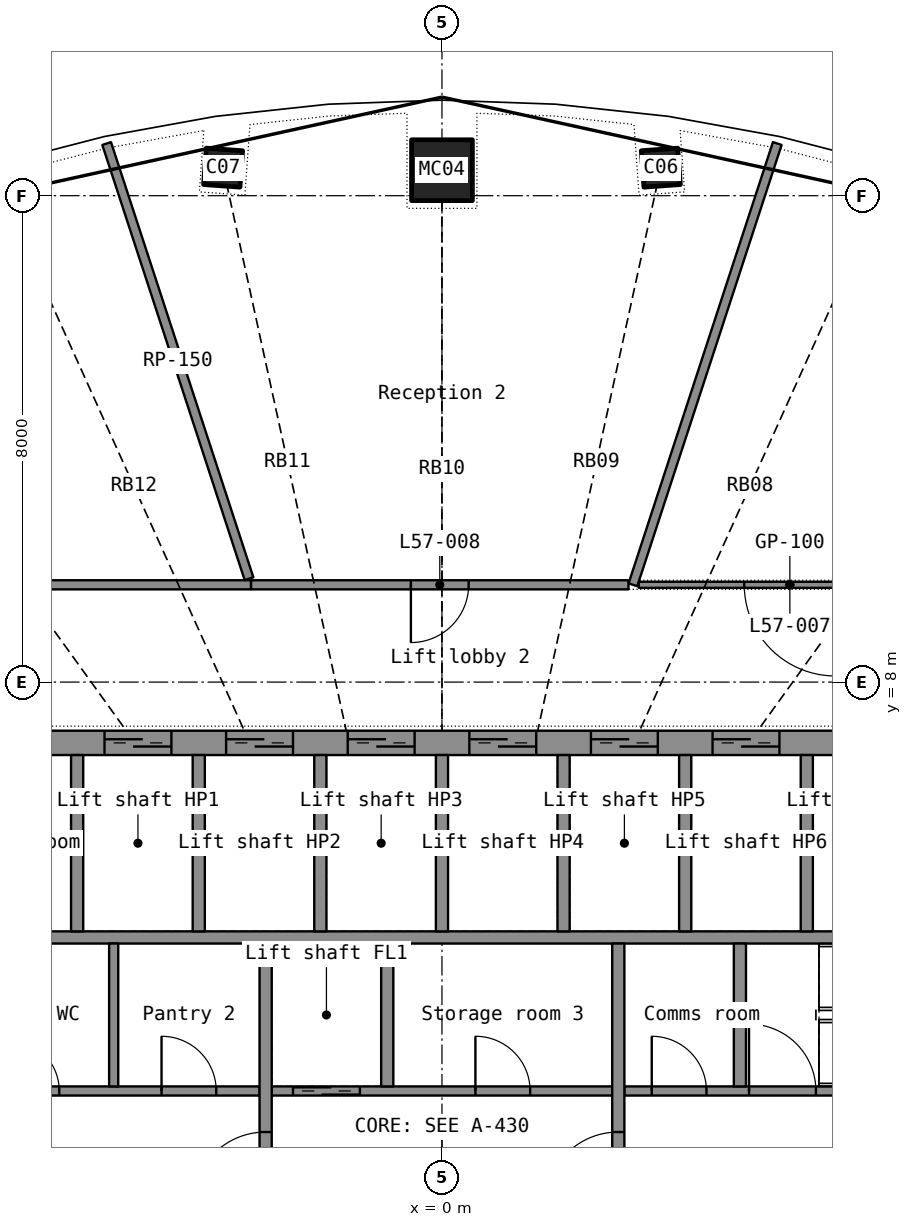
"""IFC4 building model, lengths in metres.
Left out: names, types, materials, properties, quantities, classifications, styles, units other than length and angle.
Written with IfcOpenShell. Run it as: python <this file> out.ifc"""

import sys

from ifc_helpers import new_model, si_unit, direction, frame, frame_2d, origin, origin_2d, place, context, subcontext, project, spatial, rectangle, hollow_rectangle, extrude, element, fill, save


model = new_model("IFC4")
c1 = context("Model", 3, precision=1e-05, world=origin(), true_north=direction((0.0, 1.0)))
c2 = subcontext(c1, "Body", "Model", "MODEL_VIEW")
j1 = project(units=[si_unit("LENGTHUNIT", "METRE"), si_unit("PLANEANGLEUNIT", "RADIAN")], contexts=[c1])
p1 = place(None, origin())
s1 = spatial("IfcSite", under=j1, at=p1, CompositionType="ELEMENT")
p2 = place(p1, origin())
s2 = spatial("IfcBuilding", under=s1, at=p2, CompositionType="ELEMENT")
p3 = place(p2, frame((0.0, 0.0, 235.6)))
s3 = spatial("IfcBuildingStorey", under=s2, at=p3, CompositionType="ELEMENT", Elevation=235.6)
p4 = place(p3, frame((3.6, 16.461, 0.0), z_axis=(-0.006002173, -0.027900212, 0.999592693), x_axis=(0.990201099, -0.139633766, 0.002048381)))
e1 = element("IfcColumn", 1, at=p4, inside=s3, PredefinedType="COLUMN", context=c2, shape_type="SweptSolid", body=[
    extrude(hollow_rectangle(XDim=0.6, YDim=0.6, WallThickness=0.025, at=origin_2d()), origin(), (0.0, 0.0, 1.0), 3.701),
])
p5 = place(p3, frame((0.0, 16.419, 0.0), z_axis=(0.0, -0.02836206, 0.999597716), x_axis=(1.0, 0.0, 0.0)))
e2 = element("IfcColumn", 2, at=p5, inside=s3, PredefinedType="COLUMN", context=c2, shape_type="SweptSolid", body=[
    extrude(hollow_rectangle(XDim=1.0, YDim=1.0, WallThickness=0.032, at=origin_2d()), origin(), (0.0, 0.0, 1.0), 3.701),
])
p6 = place(p3, frame((-3.6, 16.461, 0.0), z_axis=(0.006002173, -0.027900212, 0.999592693), x_axis=(0.990201099, 0.139633766, -0.002048381)))
e3 = element("IfcColumn", 3, at=p6, inside=s3, PredefinedType="COLUMN", context=c2, shape_type="SweptSolid", body=[
    extrude(hollow_rectangle(XDim=0.6, YDim=0.6, WallThickness=0.025, at=origin_2d()), origin(), (0.0, 0.0, 1.0), 3.701),
])
p7 = place(p3, frame((-11.6, 7.0, 0.0), z_axis=(0.0, 0.0, 1.0), x_axis=(1.0, 0.0, 0.0)))
e4 = element("IfcWall", 4, at=p7, inside=s3, PredefinedType="SHEAR", context=c2, shape_type="SweptSolid", body=[
    extrude(rectangle(XDim=23.2, YDim=0.4, at=frame_2d((11.6, 0.0))), origin(), (0.0, 0.0, 1.0), 3.3),
])
p8 = place(p7, frame((2.05, 0.0, 0.0)))
e5 = element("IfcOpeningElement", 5, at=p8, cuts=e4, PredefinedType="OPENING", context=c2, shape_type="SweptSolid", body=[
    extrude(rectangle(XDim=1.1, YDim=2.2, at=frame_2d((0.55, 1.1))), frame((0.0, 0.21, 0.0), z_axis=(0.0, -1.0, 0.0), x_axis=(1.0, 0.0, 0.0)), (0.0, 0.0, 1.0), 0.42),
])
p9 = place(p7, frame((6.05, 0.0, 0.0)))
e6 = element("IfcOpeningElement", 6, at=p9, cuts=e4, PredefinedType="OPENING", context=c2, shape_type="SweptSolid", body=[
    extrude(rectangle(XDim=1.1, YDim=2.2, at=frame_2d((0.55, 1.1))), frame((0.0, 0.21, 0.0), z_axis=(0.0, -1.0, 0.0), x_axis=(1.0, 0.0, 0.0)), (0.0, 0.0, 1.0), 0.42),
])
p10 = place(p7, frame((8.05, 0.0, 0.0)))
e7 = element("IfcOpeningElement", 7, at=p10, cuts=e4, PredefinedType="OPENING", context=c2, shape_type="SweptSolid", body=[
    extrude(rectangle(XDim=1.1, YDim=2.2, at=frame_2d((0.55, 1.1))), frame((0.0, 0.21, 0.0), z_axis=(0.0, -1.0, 0.0), x_axis=(1.0, 0.0, 0.0)), (0.0, 0.0, 1.0), 0.42),
])
p11 = place(p7, frame((10.05, 0.0, 0.0)))
e8 = element("IfcOpeningElement", 8, at=p11, cuts=e4, PredefinedType="OPENING", context=c2, shape_type="SweptSolid", body=[
    extrude(rectangle(XDim=1.1, YDim=2.2, at=frame_2d((0.55, 1.1))), frame((0.0, 0.21, 0.0), z_axis=(0.0, -1.0, 0.0), x_axis=(1.0, 0.0, 0.0)), (0.0, 0.0, 1.0), 0.42),
])
p12 = place(p7, frame((12.05, 0.0, 0.0)))
e9 = element("IfcOpeningElement", 9, at=p12, cuts=e4, PredefinedType="OPENING", context=c2, shape_type="SweptSolid", body=[
    extrude(rectangle(XDim=1.1, YDim=2.2, at=frame_2d((0.55, 1.1))), frame((0.0, 0.21, 0.0), z_axis=(0.0, -1.0, 0.0), x_axis=(1.0, 0.0, 0.0)), (0.0, 0.0, 1.0), 0.42),
])
p13 = place(p7, frame((14.05, 0.0, 0.0)))
e10 = element("IfcOpeningElement", 10, at=p13, cuts=e4, PredefinedType="OPENING", context=c2, shape_type="SweptSolid", body=[
    extrude(rectangle(XDim=1.1, YDim=2.2, at=frame_2d((0.55, 1.1))), frame((0.0, 0.21, 0.0), z_axis=(0.0, -1.0, 0.0), x_axis=(1.0, 0.0, 0.0)), (0.0, 0.0, 1.0), 0.42),
])
p14 = place(p7, frame((16.05, 0.0, 0.0)))
e11 = element("IfcOpeningElement", 11, at=p14, cuts=e4, PredefinedType="OPENING", context=c2, shape_type="SweptSolid", body=[
    extrude(rectangle(XDim=1.1, YDim=2.2, at=frame_2d((0.55, 1.1))), frame((0.0, 0.21, 0.0), z_axis=(0.0, -1.0, 0.0), x_axis=(1.0, 0.0, 0.0)), (0.0, 0.0, 1.0), 0.42),
])
p15 = place(p7, frame((18.05, 0.0, 0.0)))
e12 = element("IfcOpeningElement", 12, at=p15, cuts=e4, PredefinedType="OPENING", context=c2, shape_type="SweptSolid", body=[
    extrude(rectangle(XDim=1.1, YDim=2.2, at=frame_2d((0.55, 1.1))), frame((0.0, 0.21, 0.0), z_axis=(0.0, -1.0, 0.0), x_axis=(1.0, 0.0, 0.0)), (0.0, 0.0, 1.0), 0.42),
])
p16 = place(p7, frame((20.05, 0.0, 0.0)))
e13 = element("IfcOpeningElement", 13, at=p16, cuts=e4, PredefinedType="OPENING", context=c2, shape_type="SweptSolid", body=[
    extrude(rectangle(XDim=1.1, YDim=2.2, at=frame_2d((0.55, 1.1))), frame((0.0, 0.21, 0.0), z_axis=(0.0, -1.0, 0.0), x_axis=(1.0, 0.0, 0.0)), (0.0, 0.0, 1.0), 0.42),
])
p17 = place(p7, frame((4.15, 0.0, 0.0)))
e14 = element("IfcOpeningElement", 14, at=p17, cuts=e4, PredefinedType="OPENING", context=c2, shape_type="SweptSolid", body=[
    extrude(rectangle(XDim=0.9, YDim=2.1, at=frame_2d((0.45, 1.05))), frame((0.0, 0.21, 0.0), z_axis=(0.0, -1.0, 0.0), x_axis=(1.0, 0.0, 0.0)), (0.0, 0.0, 1.0), 0.42),
])
p18 = place(p7, frame((0.35, 0.0, 0.0)))
e15 = element("IfcOpeningElement", 15, at=p18, cuts=e4, PredefinedType="OPENING", context=c2, shape_type="SweptSolid", body=[
    extrude(rectangle(XDim=0.8, YDim=2.05, at=frame_2d((0.4, 1.025))), frame((0.0, 0.21, 0.0), z_axis=(0.0, -1.0, 0.0), x_axis=(1.0, 0.0, 0.0)), (0.0, 0.0, 1.0), 0.42),
])
p19 = place(p7, frame((22.05, 0.0, 0.0)))
e16 = element("IfcOpeningElement", 16, at=p19, cuts=e4, PredefinedType="OPENING", context=c2, shape_type="SweptSolid", body=[
    extrude(rectangle(XDim=0.8, YDim=2.05, at=frame_2d((0.4, 1.025))), frame((0.0, 0.21, 0.0), z_axis=(0.0, -1.0, 0.0), x_axis=(1.0, 0.0, 0.0)), (0.0, 0.0, 1.0), 0.42),
])
p20 = place(p3, frame((-11.6, 3.8, 0.0), z_axis=(0.0, 0.0, 1.0), x_axis=(1.0, 0.0, 0.0)))
e17 = element("IfcWall", 17, at=p20, inside=s3, PredefinedType="SHEAR", context=c2, shape_type="SweptSolid", body=[
    extrude(rectangle(XDim=23.2, YDim=0.2, at=frame_2d((11.6, 0.0))), origin(), (0.0, 0.0, 1.0), 3.3),
])
for number, where, z_axis, x_axis in (
    (18, (-6.0, 3.9, 0.0), (0.0, 0.0, 1.0), (0.0, 1.0, 0.0)),
    (19, (-4.0, 3.9, 0.0), (0.0, 0.0, 1.0), (0.0, 1.0, 0.0)),
    (20, (-2.0, 3.9, 0.0), (0.0, 0.0, 1.0), (0.0, 1.0, 0.0)),
    (21, (0.0, 3.9, 0.0), (0.0, 0.0, 1.0), (0.0, 1.0, 0.0)),
    (22, (2.0, 3.9, 0.0), (0.0, 0.0, 1.0), (0.0, 1.0, 0.0)),
    (23, (4.0, 3.9, 0.0), (0.0, 0.0, 1.0), (0.0, 1.0, 0.0)),
    (24, (6.0, 3.9, 0.0), (0.0, 0.0, 1.0), (0.0, 1.0, 0.0)),
):
    element("IfcWall", number, at=place(p3, frame(where, z_axis=z_axis, x_axis=x_axis)), inside=s3, PredefinedType="SHEAR", context=c2, shape_type="SweptSolid", body=[
        extrude(rectangle(XDim=2.9, YDim=0.2, at=frame_2d((1.45, 0.0))), origin(), (0.0, 0.0, 1.0), 3.3),
    ])
p21 = place(p3, frame((-11.6, 1.275, 0.0), z_axis=(0.0, 0.0, 1.0), x_axis=(1.0, 0.0, 0.0)))
e25 = element("IfcWall", 25, at=p21, inside=s3, PredefinedType="PARTITIONING", context=c2, shape_type="SweptSolid", body=[
    extrude(rectangle(XDim=8.6, YDim=0.15, at=frame_2d((4.3, 0.0))), origin(), (0.0, 0.0, 1.0), 3.3),
])
p22 = place(p21, frame((1.318, 0.0, 0.0)))
e26 = element("IfcOpeningElement", 26, at=p22, cuts=e25, PredefinedType="OPENING", context=c2, shape_type="SweptSolid", body=[
    extrude(rectangle(XDim=0.85, YDim=2.1, at=frame_2d((0.425, 1.05))), frame((0.0, 0.085, 0.0), z_axis=(0.0, -1.0, 0.0), x_axis=(1.0, 0.0, 0.0)), (0.0, 0.0, 1.0), 0.17),
])
p23 = place(p21, frame((4.456, 0.0, 0.0)))
e27 = element("IfcOpeningElement", 27, at=p23, cuts=e25, PredefinedType="OPENING", context=c2, shape_type="SweptSolid", body=[
    extrude(rectangle(XDim=0.85, YDim=2.1, at=frame_2d((0.425, 1.05))), frame((0.0, 0.085, 0.0), z_axis=(0.0, -1.0, 0.0), x_axis=(1.0, 0.0, 0.0)), (0.0, 0.0, 1.0), 0.17),
])
p24 = place(p21, frame((6.988, 0.0, 0.0)))
e28 = element("IfcOpeningElement", 28, at=p24, cuts=e25, PredefinedType="OPENING", context=c2, shape_type="SweptSolid", body=[
    extrude(rectangle(XDim=0.9, YDim=2.1, at=frame_2d((0.45, 1.05))), frame((0.0, 0.085, 0.0), z_axis=(0.0, -1.0, 0.0), x_axis=(1.0, 0.0, 0.0)), (0.0, 0.0, 1.0), 0.17),
])
p25 = place(p3, frame((-2.8, 1.275, 0.0), z_axis=(0.0, 0.0, 1.0), x_axis=(1.0, 0.0, 0.0)))
e29 = element("IfcWall", 29, at=p25, inside=s3, PredefinedType="SHEAR", context=c2, shape_type="SweptSolid", body=[
    extrude(rectangle(XDim=5.6, YDim=0.15, at=frame_2d((2.8, 0.0))), origin(), (0.0, 0.0, 1.0), 3.3),
])
p26 = place(p25, frame((0.35, 0.0, 0.0)))
e30 = element("IfcOpeningElement", 30, at=p26, cuts=e29, PredefinedType="OPENING", context=c2, shape_type="SweptSolid", body=[
    extrude(rectangle(XDim=1.1, YDim=2.2, at=frame_2d((0.55, 1.1))), frame((0.0, 0.085, 0.0), z_axis=(0.0, -1.0, 0.0), x_axis=(1.0, 0.0, 0.0)), (0.0, 0.0, 1.0), 0.17),
])
p27 = place(p25, frame((3.35, 0.0, 0.0)))
e31 = element("IfcOpeningElement", 31, at=p27, cuts=e29, PredefinedType="OPENING", context=c2, shape_type="SweptSolid", body=[
    extrude(rectangle(XDim=0.9, YDim=2.1, at=frame_2d((0.45, 1.05))), frame((0.0, 0.085, 0.0), z_axis=(0.0, -1.0, 0.0), x_axis=(1.0, 0.0, 0.0)), (0.0, 0.0, 1.0), 0.17),
])
p28 = place(p3, frame((3.0, 1.275, 0.0), z_axis=(0.0, 0.0, 1.0), x_axis=(1.0, 0.0, 0.0)))
e32 = element("IfcWall", 32, at=p28, inside=s3, PredefinedType="SHEAR", context=c2, shape_type="SweptSolid", body=[
    extrude(rectangle(XDim=8.6, YDim=0.15, at=frame_2d((4.3, 0.0))), origin(), (0.0, 0.0, 1.0), 3.3),
])
p29 = place(p28, frame((2.05, 0.0, 0.0)))
e33 = element("IfcOpeningElement", 33, at=p29, cuts=e32, PredefinedType="OPENING", context=c2, shape_type="SweptSolid", body=[
    extrude(rectangle(XDim=1.1, YDim=2.15, at=frame_2d((0.55, 1.075))), frame((0.0, 0.085, 0.0), z_axis=(0.0, -1.0, 0.0), x_axis=(1.0, 0.0, 0.0)), (0.0, 0.0, 1.0), 0.17),
])
p30 = place(p28, frame((0.45, 0.0, 0.0)))
e34 = element("IfcOpeningElement", 34, at=p30, cuts=e32, PredefinedType="OPENING", context=c2, shape_type="SweptSolid", body=[
    extrude(rectangle(XDim=0.9, YDim=2.1, at=frame_2d((0.45, 1.05))), frame((0.0, 0.085, 0.0), z_axis=(0.0, -1.0, 0.0), x_axis=(1.0, 0.0, 0.0)), (0.0, 0.0, 1.0), 0.17),
])
p31 = place(p3, frame((-2.9, -3.7, 0.0), z_axis=(0.0, 0.0, 1.0), x_axis=(0.0, 1.0, 0.0)))
e35 = element("IfcWall", 35, at=p31, inside=s3, PredefinedType="SHEAR", context=c2, shape_type="SweptSolid", body=[
    extrude(rectangle(XDim=7.4, YDim=0.2, at=frame_2d((3.7, 0.0))), origin(), (0.0, 0.0, 1.0), 3.3),
])
p32 = place(p31, frame((3.1, 0.0, 0.0)))
e36 = element("IfcOpeningElement", 36, at=p32, cuts=e35, PredefinedType="OPENING", context=c2, shape_type="SweptSolid", body=[
    extrude(rectangle(XDim=1.2, YDim=2.2, at=frame_2d((0.6, 1.1))), frame((0.0, 0.11, 0.0), z_axis=(0.0, -1.0, 0.0), x_axis=(1.0, 0.0, 0.0)), (0.0, 0.0, 1.0), 0.22),
])
p33 = place(p3, frame((2.9, -3.7, 0.0), z_axis=(0.0, 0.0, 1.0), x_axis=(0.0, 1.0, 0.0)))
e37 = element("IfcWall", 37, at=p33, inside=s3, PredefinedType="SHEAR", context=c2, shape_type="SweptSolid", body=[
    extrude(rectangle(XDim=7.4, YDim=0.2, at=frame_2d((3.7, 0.0))), origin(), (0.0, 0.0, 1.0), 3.3),
])
p34 = place(p33, frame((3.1, 0.0, 0.0)))
e38 = element("IfcOpeningElement", 38, at=p34, cuts=e37, PredefinedType="OPENING", context=c2, shape_type="SweptSolid", body=[
    extrude(rectangle(XDim=1.2, YDim=2.2, at=frame_2d((0.6, 1.1))), frame((0.0, 0.11, 0.0), z_axis=(0.0, -1.0, 0.0), x_axis=(1.0, 0.0, 0.0)), (0.0, 0.0, 1.0), 0.22),
])
for number, where, z_axis, x_axis in (
    (39, (-0.9, 1.35, 0.0), (0.0, 0.0, 1.0), (0.0, 1.0, 0.0)),
    (40, (4.9, 1.35, 0.0), (0.0, 0.0, 1.0), (0.0, 1.0, 0.0)),
):
    element("IfcWall", number, at=place(p3, frame(where, z_axis=z_axis, x_axis=x_axis)), inside=s3, PredefinedType="SHEAR", context=c2, shape_type="SweptSolid", body=[
        extrude(rectangle(XDim=2.35, YDim=0.2, at=frame_2d((1.175, 0.0))), origin(), (0.0, 0.0, 1.0), 3.3),
    ])
p35 = place(p3, frame((-5.399, 1.35, 0.0), z_axis=(0.0, 0.0, 1.0), x_axis=(0.0, 1.0, 0.0)))
e41 = element("IfcWall", 41, at=p35, inside=s3, PredefinedType="PARTITIONING", context=c2, shape_type="SweptSolid", body=[
    extrude(rectangle(XDim=2.35, YDim=0.15, at=frame_2d((1.175, 0.0))), origin(), (0.0, 0.0, 1.0), 3.3),
])
p36 = place(p3, frame((-3.14, 9.6, 0.0), z_axis=(0.0, 0.0, 1.0), x_axis=(-1.0, 0.0, 0.0)))
e42 = element("IfcWall", 42, at=p36, inside=s3, PredefinedType="PARTITIONING", context=c2, shape_type="SweptSolid", body=[
    extrude(rectangle(XDim=8.58, YDim=0.15, at=frame_2d((4.29, 0.0))), origin(), (0.0, 0.0, 1.0), 2.4),
])
p37 = place(p36, frame((3.815, 0.0, 0.0)))
e43 = element("IfcOpeningElement", 43, at=p37, cuts=e42, PredefinedType="OPENING", context=c2, shape_type="SweptSolid", body=[
    extrude(rectangle(XDim=0.95, YDim=2.15, at=frame_2d((0.475, 1.075))), frame((0.0, 0.085, 0.0), z_axis=(0.0, -1.0, 0.0), x_axis=(1.0, 0.0, 0.0)), (0.0, 0.0, 1.0), 0.17),
])
p38 = place(p3, frame((-5.515, 16.858, 0.0), z_axis=(0.0, 0.0, 1.0), x_axis=(0.310922463, -0.95043528, 0.0)))
e44 = element("IfcWall", 44, at=p38, inside=s3, PredefinedType="PARTITIONING", context=c2, shape_type="SweptSolid", body=[
    extrude(rectangle(XDim=7.531, YDim=0.15, at=frame_2d((3.766, 0.0))), origin(), (0.0, 0.0, 1.0), 2.4),
])
p39 = place(p3, frame((5.515, 16.858, 0.0), z_axis=(0.0, 0.0, 1.0), x_axis=(-0.31091882, -0.950436472, 0.0)))
e45 = element("IfcWall", 45, at=p39, inside=s3, PredefinedType="PARTITIONING", context=c2, shape_type="SweptSolid", body=[
    extrude(rectangle(XDim=7.636, YDim=0.15, at=frame_2d((3.818, 0.0))), origin(), (0.0, 0.0, 1.0), 2.4),
])
p40 = place(p3, frame((3.067, 9.6, 0.0), z_axis=(0.0, 0.0, 1.0), x_axis=(-1.0, 0.0, 0.0)))
e46 = element("IfcWall", 46, at=p40, inside=s3, PredefinedType="PARTITIONING", context=c2, shape_type="SweptSolid", body=[
    extrude(rectangle(XDim=6.207, YDim=0.15, at=frame_2d((3.103, 0.0))), origin(), (0.0, 0.0, 1.0), 2.4),
])
p41 = place(p40, frame((2.628, 0.0, 0.0)))
e47 = element("IfcOpeningElement", 47, at=p41, cuts=e46, PredefinedType="OPENING", context=c2, shape_type="SweptSolid", body=[
    extrude(rectangle(XDim=0.95, YDim=2.15, at=frame_2d((0.475, 1.075))), frame((0.0, 0.085, 0.0), z_axis=(0.0, -1.0, 0.0), x_axis=(1.0, 0.0, 0.0)), (0.0, 0.0, 1.0), 0.17),
])
p42 = place(p3, frame((8.206, 9.6, 0.0), z_axis=(0.0, 0.0, 1.0), x_axis=(-1.0, 0.0, 0.0)))
e48 = element("IfcWall", 48, at=p42, inside=s3, PredefinedType="PARTITIONING", context=c2, shape_type="SweptSolid", body=[
    extrude(rectangle(XDim=4.968, YDim=0.1, at=frame_2d((2.484, 0.0))), origin(), (0.0, 0.0, 1.0), 2.4),
])
p43 = place(p42, frame((1.734, 0.0, 0.0)))
e49 = element("IfcOpeningElement", 49, at=p43, cuts=e48, PredefinedType="OPENING", context=c2, shape_type="SweptSolid", body=[
    extrude(rectangle(XDim=1.5, YDim=2.4, at=frame_2d((0.75, 1.2))), frame((0.0, 0.06, 0.0), z_axis=(0.0, -1.0, 0.0), x_axis=(1.0, 0.0, 0.0)), (0.0, 0.0, 1.0), 0.12),
])
p44 = place(p9, origin())
e50 = element("IfcDoor", 50, at=p44, inside=s3, OperationType="DOUBLE_DOOR_SLIDING", PredefinedType="DOOR", context=c2, shape_type="SweptSolid", body=[
    extrude(rectangle(XDim=1.1, YDim=2.2, at=frame_2d((0.55, 1.1))), frame((0.0, 0.025, 0.0), z_axis=(0.0, -1.0, 0.0), x_axis=(1.0, 0.0, 0.0)), (0.0, 0.0, 1.0), 0.05),
])
fill(e6, e50)
p45 = place(p10, origin())
e51 = element("IfcDoor", 51, at=p45, inside=s3, OperationType="DOUBLE_DOOR_SLIDING", PredefinedType="DOOR", context=c2, shape_type="SweptSolid", body=[
    extrude(rectangle(XDim=1.1, YDim=2.2, at=frame_2d((0.55, 1.1))), frame((0.0, 0.025, 0.0), z_axis=(0.0, -1.0, 0.0), x_axis=(1.0, 0.0, 0.0)), (0.0, 0.0, 1.0), 0.05),
])
fill(e7, e51)
p46 = place(p11, origin())
e52 = element("IfcDoor", 52, at=p46, inside=s3, OperationType="DOUBLE_DOOR_SLIDING", PredefinedType="DOOR", context=c2, shape_type="SweptSolid", body=[
    extrude(rectangle(XDim=1.1, YDim=2.2, at=frame_2d((0.55, 1.1))), frame((0.0, 0.025, 0.0), z_axis=(0.0, -1.0, 0.0), x_axis=(1.0, 0.0, 0.0)), (0.0, 0.0, 1.0), 0.05),
])
fill(e8, e52)
p47 = place(p12, origin())
e53 = element("IfcDoor", 53, at=p47, inside=s3, OperationType="DOUBLE_DOOR_SLIDING", PredefinedType="DOOR", context=c2, shape_type="SweptSolid", body=[
    extrude(rectangle(XDim=1.1, YDim=2.2, at=frame_2d((0.55, 1.1))), frame((0.0, 0.025, 0.0), z_axis=(0.0, -1.0, 0.0), x_axis=(1.0, 0.0, 0.0)), (0.0, 0.0, 1.0), 0.05),
])
fill(e9, e53)
p48 = place(p13, origin())
e54 = element("IfcDoor", 54, at=p48, inside=s3, OperationType="DOUBLE_DOOR_SLIDING", PredefinedType="DOOR", context=c2, shape_type="SweptSolid", body=[
    extrude(rectangle(XDim=1.1, YDim=2.2, at=frame_2d((0.55, 1.1))), frame((0.0, 0.025, 0.0), z_axis=(0.0, -1.0, 0.0), x_axis=(1.0, 0.0, 0.0)), (0.0, 0.0, 1.0), 0.05),
])
fill(e10, e54)
p49 = place(p14, origin())
e55 = element("IfcDoor", 55, at=p49, inside=s3, OperationType="DOUBLE_DOOR_SLIDING", PredefinedType="DOOR", context=c2, shape_type="SweptSolid", body=[
    extrude(rectangle(XDim=1.1, YDim=2.2, at=frame_2d((0.55, 1.1))), frame((0.0, 0.025, 0.0), z_axis=(0.0, -1.0, 0.0), x_axis=(1.0, 0.0, 0.0)), (0.0, 0.0, 1.0), 0.05),
])
fill(e11, e55)
p50 = place(p32, origin())
e56 = element("IfcDoor", 56, at=p50, inside=s3, OperationType="SINGLE_SWING_LEFT", PredefinedType="DOOR", context=c2, shape_type="SweptSolid", body=[
    extrude(rectangle(XDim=1.2, YDim=2.2, at=frame_2d((0.6, 1.1))), frame((0.0, 0.025, 0.0), z_axis=(0.0, -1.0, 0.0), x_axis=(1.0, 0.0, 0.0)), (0.0, 0.0, 1.0), 0.05),
])
fill(e36, e56)
p51 = place(p34, origin())
e57 = element("IfcDoor", 57, at=p51, inside=s3, OperationType="SINGLE_SWING_LEFT", PredefinedType="DOOR", context=c2, shape_type="SweptSolid", body=[
    extrude(rectangle(XDim=1.2, YDim=2.2, at=frame_2d((0.6, 1.1))), frame((0.0, 0.025, 0.0), z_axis=(0.0, -1.0, 0.0), x_axis=(1.0, 0.0, 0.0)), (0.0, 0.0, 1.0), 0.05),
])
fill(e38, e57)
p52 = place(p26, origin())
e58 = element("IfcDoor", 58, at=p52, inside=s3, OperationType="DOUBLE_DOOR_SLIDING", PredefinedType="DOOR", context=c2, shape_type="SweptSolid", body=[
    extrude(rectangle(XDim=1.1, YDim=2.2, at=frame_2d((0.55, 1.1))), frame((0.0, 0.025, 0.0), z_axis=(0.0, -1.0, 0.0), x_axis=(1.0, 0.0, 0.0)), (0.0, 0.0, 1.0), 0.05),
])
fill(e30, e58)
p53 = place(p29, origin())
e59 = element("IfcDoor", 59, at=p53, inside=s3, OperationType="SINGLE_SWING_LEFT", PredefinedType="DOOR", context=c2, shape_type="SweptSolid", body=[
    extrude(rectangle(XDim=1.1, YDim=2.15, at=frame_2d((0.55, 1.075))), frame((0.0, 0.025, 0.0), z_axis=(0.0, -1.0, 0.0), x_axis=(1.0, 0.0, 0.0)), (0.0, 0.0, 1.0), 0.05),
])
fill(e33, e59)
p54 = place(p23, origin())
e60 = element("IfcDoor", 60, at=p54, inside=s3, OperationType="SINGLE_SWING_LEFT", PredefinedType="DOOR", context=c2, shape_type="SweptSolid", body=[
    extrude(rectangle(XDim=0.85, YDim=2.1, at=frame_2d((0.425, 1.05))), frame((0.0, 0.025, 0.0), z_axis=(0.0, -1.0, 0.0), x_axis=(1.0, 0.0, 0.0)), (0.0, 0.0, 1.0), 0.05),
])
fill(e27, e60)
p55 = place(p24, origin())
e61 = element("IfcDoor", 61, at=p55, inside=s3, OperationType="SINGLE_SWING_LEFT", PredefinedType="DOOR", context=c2, shape_type="SweptSolid", body=[
    extrude(rectangle(XDim=0.9, YDim=2.1, at=frame_2d((0.45, 1.05))), frame((0.0, 0.025, 0.0), z_axis=(0.0, -1.0, 0.0), x_axis=(1.0, 0.0, 0.0)), (0.0, 0.0, 1.0), 0.05),
])
fill(e28, e61)
p56 = place(p27, origin())
e62 = element("IfcDoor", 62, at=p56, inside=s3, OperationType="SINGLE_SWING_LEFT", PredefinedType="DOOR", context=c2, shape_type="SweptSolid", body=[
    extrude(rectangle(XDim=0.9, YDim=2.1, at=frame_2d((0.45, 1.05))), frame((0.0, 0.025, 0.0), z_axis=(0.0, -1.0, 0.0), x_axis=(1.0, 0.0, 0.0)), (0.0, 0.0, 1.0), 0.05),
])
fill(e31, e62)
p57 = place(p30, origin())
e63 = element("IfcDoor", 63, at=p57, inside=s3, OperationType="SINGLE_SWING_LEFT", PredefinedType="DOOR", context=c2, shape_type="SweptSolid", body=[
    extrude(rectangle(XDim=0.9, YDim=2.1, at=frame_2d((0.45, 1.05))), frame((0.0, 0.025, 0.0), z_axis=(0.0, -1.0, 0.0), x_axis=(1.0, 0.0, 0.0)), (0.0, 0.0, 1.0), 0.05),
])
fill(e34, e63)
p58 = place(p43, origin())
e64 = element("IfcDoor", 64, at=p58, inside=s3, OperationType="DOUBLE_DOOR_SINGLE_SWING", PredefinedType="DOOR", context=c2, shape_type="SweptSolid", body=[
    extrude(rectangle(XDim=1.5, YDim=2.4, at=frame_2d((0.75, 1.2))), frame((0.0, 0.025, 0.0), z_axis=(0.0, -1.0, 0.0), x_axis=(1.0, 0.0, 0.0)), (0.0, 0.0, 1.0), 0.05),
])
fill(e49, e64)
p59 = place(p41, origin())
e65 = element("IfcDoor", 65, at=p59, inside=s3, OperationType="SINGLE_SWING_RIGHT", PredefinedType="DOOR", context=c2, shape_type="SweptSolid", body=[
    extrude(rectangle(XDim=0.95, YDim=2.15, at=frame_2d((0.475, 1.075))), frame((0.0, 0.025, 0.0), z_axis=(0.0, -1.0, 0.0), x_axis=(1.0, 0.0, 0.0)), (0.0, 0.0, 1.0), 0.05),
])
fill(e47, e65)
save(model, sys.argv[1])
